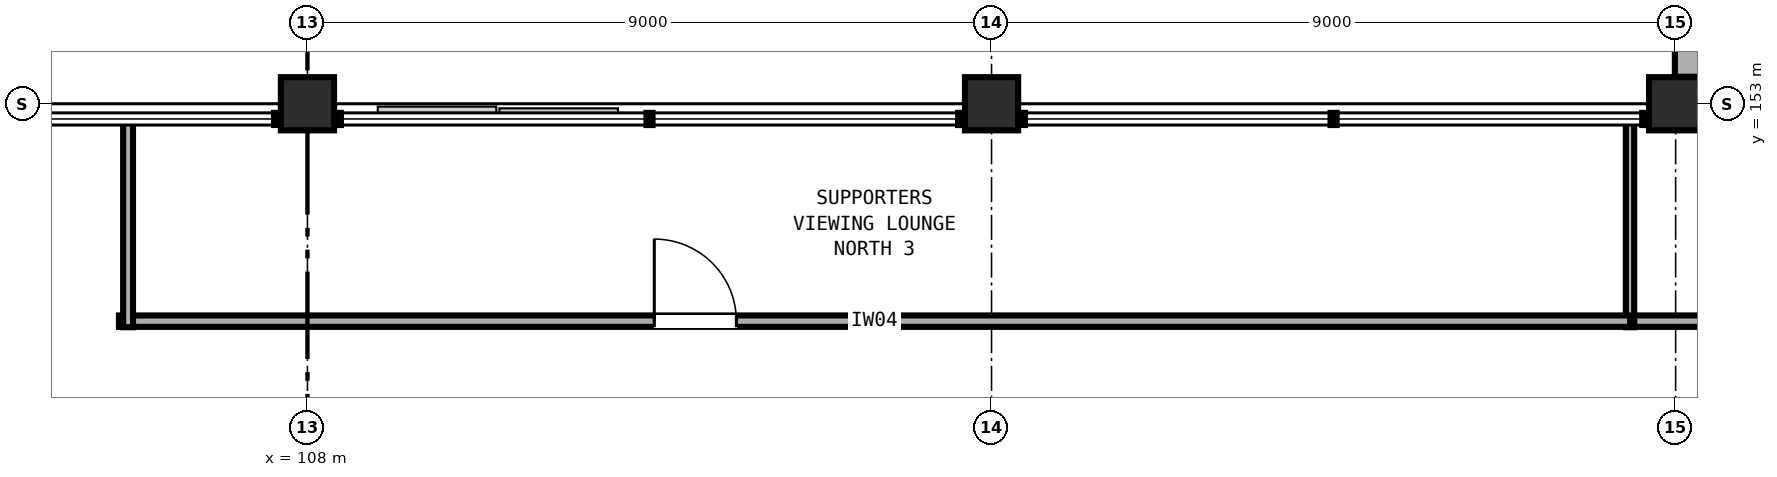
"""IFC4 building model, lengths in metres.
Left out: names, types, materials, properties, quantities, classifications, styles, units other than length and angle.
Written with IfcOpenShell. Run it as: python <this file> out.ifc"""

import sys

from ifc_helpers import new_model, si_unit, direction, frame, frame_2d, origin, origin_2d, place, context, subcontext, project, spatial, rectangle, extrude, element, fill, save


model = new_model("IFC4")
c1 = context("Model", 3, precision=1e-05, world=origin(), true_north=direction((0.0, 1.0)))
c2 = subcontext(c1, "Body", "Model", "MODEL_VIEW")
j1 = project(units=[si_unit("LENGTHUNIT", "METRE"), si_unit("PLANEANGLEUNIT", "RADIAN")], contexts=[c1])
p1 = place(None, origin())
s1 = spatial("IfcSite", under=j1, at=p1, CompositionType="ELEMENT")
p2 = place(p1, origin())
s2 = spatial("IfcBuilding", under=s1, at=p2, CompositionType="ELEMENT")
p3 = place(p2, frame((0.0, 0.0, 9.6)))
s3 = spatial("IfcBuildingStorey", under=s2, at=p3, CompositionType="ELEMENT", Elevation=9.6)
for number, where, z_axis, x_axis in (
    (1, (108.0, 153.0, 0.0), (0.0, 0.0, 1.0), (1.0, 0.0, 0.0)),
    (2, (117.0, 153.0, 0.0), (0.0, 0.0, 1.0), (1.0, 0.0, 0.0)),
    (3, (126.0, 153.0, 0.0), (0.0, 0.0, 1.0), (1.0, 0.0, 0.0)),
):
    element("IfcColumn", number, at=place(p3, frame(where, z_axis=z_axis, x_axis=x_axis)), inside=s3, PredefinedType="COLUMN", context=c2, shape_type="SweptSolid", body=[
        extrude(rectangle(XDim=0.7, YDim=0.7, at=origin_2d()), origin(), (0.0, 0.0, 1.0), 4.8),
    ])
p4 = place(p3, frame((126.2, 153.355, 0.0), z_axis=(0.0, 0.0, 1.0), x_axis=(0.0, 1.0, 0.0)))
e4 = element("IfcWall", 4, at=p4, inside=s3, PredefinedType="SOLIDWALL", context=c2, shape_type="SweptSolid", body=[
    extrude(rectangle(XDim=1.645, YDim=0.42, at=frame_2d((0.823, 0.0))), origin(), (0.0, 0.0, 1.0), 3.58),
])
p5 = place(p3, frame((125.4, 150.14, 0.0), z_axis=(0.0, 0.0, 1.0), x_axis=(1.0, 0.0, 0.0)))
e5 = element("IfcWall", 5, at=p5, inside=s3, PredefinedType="PARTITIONING", context=c2, shape_type="SweptSolid", body=[
    extrude(rectangle(XDim=19.88, YDim=0.15, at=frame_2d((9.94, 0.0))), origin(), (0.0, 0.0, 1.0), 3.56),
])
p6 = place(p5, frame((5.93, 0.0, 0.0)))
e6 = element("IfcOpeningElement", 6, at=p6, cuts=e5, PredefinedType="OPENING", context=c2, shape_type="SweptSolid", body=[
    extrude(rectangle(XDim=0.95, YDim=2.18, at=frame_2d((0.475, 1.09))), frame((0.0, 0.085, 0.0), z_axis=(0.0, -1.0, 0.0), x_axis=(1.0, 0.0, 0.0)), (0.0, 0.0, 1.0), 0.17),
])
p7 = place(p3, frame((125.4, 150.06, 0.0), z_axis=(0.0, 0.0, 1.0), x_axis=(0.0, 1.0, 0.0)))
e7 = element("IfcWall", 7, at=p7, inside=s3, PredefinedType="PARTITIONING", context=c2, shape_type="SweptSolid", body=[
    extrude(rectangle(XDim=2.707, YDim=0.11, at=frame_2d((1.354, 0.0))), origin(), (0.0, 0.0, 1.0), 3.56),
])
p8 = place(p3, frame((105.52, 150.14, 0.0), z_axis=(0.0, 0.0, 1.0), x_axis=(1.0, 0.0, 0.0)))
e8 = element("IfcWall", 8, at=p8, inside=s3, PredefinedType="PARTITIONING", context=c2, shape_type="SweptSolid", body=[
    extrude(rectangle(XDim=19.88, YDim=0.15, at=frame_2d((9.94, 0.0))), origin(), (0.0, 0.0, 1.0), 3.56),
])
p9 = place(p8, frame((7.043, 0.0, 0.0)))
e9 = element("IfcOpeningElement", 9, at=p9, cuts=e8, PredefinedType="OPENING", context=c2, shape_type="SweptSolid", body=[
    extrude(rectangle(XDim=1.08, YDim=2.18, at=frame_2d((0.54, 1.09))), frame((0.0, 0.085, 0.0), z_axis=(0.0, -1.0, 0.0), x_axis=(1.0, 0.0, 0.0)), (0.0, 0.0, 1.0), 0.17),
])
p10 = place(p3, frame((105.64, 150.06, 0.0), z_axis=(0.0, 0.0, 1.0), x_axis=(0.0, 1.0, 0.0)))
e10 = element("IfcWall", 10, at=p10, inside=s3, PredefinedType="PARTITIONING", context=c2, shape_type="SweptSolid", body=[
    extrude(rectangle(XDim=2.707, YDim=0.13, at=frame_2d((1.354, 0.0))), origin(), (0.0, 0.0, 1.0), 3.56),
])
p11 = place(p9, origin())
e11 = element("IfcDoor", 11, at=p11, inside=s3, OperationType="SINGLE_SWING_LEFT", PredefinedType="DOOR", context=c2, shape_type="SweptSolid", body=[
    extrude(rectangle(XDim=1.08, YDim=2.18, at=frame_2d((0.54, 1.09))), frame((0.0, 0.025, 0.0), z_axis=(0.0, -1.0, 0.0), x_axis=(1.0, 0.0, 0.0)), (0.0, 0.0, 1.0), 0.05),
])
fill(e9, e11)
save(model, sys.argv[1])
